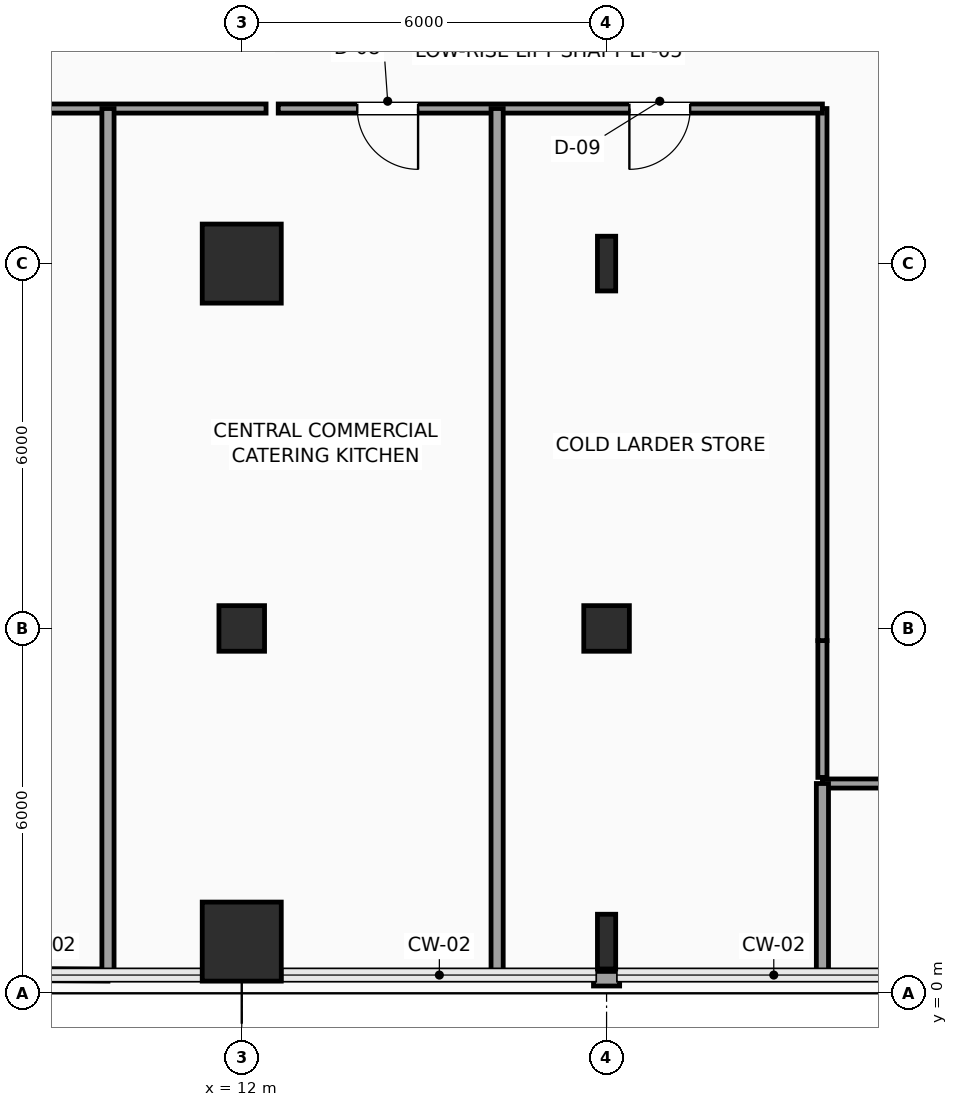
"""IFC4 building model, lengths in metres.
Left out: names, types, materials, properties, quantities, classifications, styles, units other than length and angle.
Written with IfcOpenShell. Run it as: python <this file> out.ifc"""

import sys

from ifc_helpers import new_model, si_unit, direction, frame, frame_2d, origin, origin_2d, place, context, subcontext, project, spatial, rectangle, hollow_rectangle, i_section, extrude, element, fill, save


model = new_model("IFC4")
c1 = context("Model", 3, precision=1e-05, world=origin(), true_north=direction((0.0, 1.0)))
c2 = subcontext(c1, "Body", "Model", "MODEL_VIEW")
j1 = project(units=[si_unit("LENGTHUNIT", "METRE"), si_unit("PLANEANGLEUNIT", "RADIAN")], contexts=[c1])
p1 = place(None, origin())
s1 = spatial("IfcSite", under=j1, at=p1, CompositionType="ELEMENT")
p2 = place(p1, origin())
s2 = spatial("IfcBuilding", under=s1, at=p2, CompositionType="ELEMENT")
p3 = place(p2, frame((0.0, 0.0, 75.3)))
s3 = spatial("IfcBuildingStorey", under=s2, at=p3, CompositionType="ELEMENT", Elevation=75.3)
p4 = place(p3, frame((12.0, 0.85, 0.0), z_axis=(0.0, 0.0, 1.0), x_axis=(1.0, 0.0, 0.0)))
e1 = element("IfcColumn", 1, at=p4, inside=s3, PredefinedType="COLUMN", context=c2, shape_type="SweptSolid", body=[
    extrude(rectangle(XDim=1.3, YDim=1.3, at=origin_2d()), origin(), (0.0, 0.0, 1.0), 3.9),
])
p5 = place(p3, frame((12.0, 6.0, 0.0), z_axis=(0.0, 0.0, 1.0), x_axis=(1.0, 0.0, 0.0)))
e2 = element("IfcColumn", 2, at=p5, inside=s3, PredefinedType="COLUMN", context=c2, shape_type="SweptSolid", body=[
    extrude(hollow_rectangle(XDim=0.75, YDim=0.75, WallThickness=0.035, InnerFilletRadius=0.035, OuterFilletRadius=0.05, at=origin_2d()), origin(), (0.0, 0.0, 1.0), 3.9),
])
p6 = place(p3, frame((12.0, 12.0, 0.0), z_axis=(0.0, 0.0, 1.0), x_axis=(1.0, 0.0, 0.0)))
e3 = element("IfcColumn", 3, at=p6, inside=s3, PredefinedType="COLUMN", context=c2, shape_type="SweptSolid", body=[
    extrude(rectangle(XDim=1.3, YDim=1.3, at=origin_2d()), origin(), (0.0, 0.0, 1.0), 3.9),
])
p7 = place(p3, frame((18.0, 0.85, 0.0), z_axis=(0.0, 0.0, 1.0), x_axis=(1.0, 0.0, 0.0)))
e4 = element("IfcColumn", 4, at=p7, inside=s3, PredefinedType="COLUMN", context=c2, shape_type="SweptSolid", body=[
    extrude(i_section(OverallWidth=0.3, OverallDepth=0.9, WebThickness=0.019, FlangeThickness=0.035, FilletRadius=0.03, at=origin_2d()), origin(), (0.0, 0.0, 1.0), 3.9),
])
p8 = place(p3, frame((18.0, 6.0, 0.0), z_axis=(0.0, 0.0, 1.0), x_axis=(1.0, 0.0, 0.0)))
e5 = element("IfcColumn", 5, at=p8, inside=s3, PredefinedType="COLUMN", context=c2, shape_type="SweptSolid", body=[
    extrude(hollow_rectangle(XDim=0.75, YDim=0.75, WallThickness=0.035, InnerFilletRadius=0.035, OuterFilletRadius=0.05, at=origin_2d()), origin(), (0.0, 0.0, 1.0), 3.9),
])
p9 = place(p3, frame((18.0, 12.0, 0.0), z_axis=(0.0, 0.0, 1.0), x_axis=(1.0, 0.0, 0.0)))
e6 = element("IfcColumn", 6, at=p9, inside=s3, PredefinedType="COLUMN", context=c2, shape_type="SweptSolid", body=[
    extrude(i_section(OverallWidth=0.3, OverallDepth=0.9, WebThickness=0.019, FlangeThickness=0.035, FilletRadius=0.03, at=origin_2d()), origin(), (0.0, 0.0, 1.0), 3.9),
])
p10 = place(p3, frame((18.215, 0.24, 0.0), z_axis=(0.0, 0.0, 1.0), x_axis=(-1.0, 0.0, 0.0)))
e7 = element("IfcWall", 7, at=p10, inside=s3, PredefinedType="SOLIDWALL", context=c2, shape_type="SweptSolid", body=[
    extrude(rectangle(XDim=0.43, YDim=0.24, at=frame_2d((0.215, 0.0))), origin(), (0.0, 0.0, 1.0), 3.65),
])
p11 = place(p3, frame((36.15, 3.45, 0.0), z_axis=(0.0, 0.0, 1.0), x_axis=(-1.0, 0.0, 0.0)))
e8 = element("IfcWall", 8, at=p11, inside=s3, PredefinedType="PARTITIONING", context=c2, shape_type="SweptSolid", body=[
    extrude(rectangle(XDim=14.6, YDim=0.15, at=frame_2d((7.3, 0.0))), origin(), (0.0, 0.0, 1.0), 3.142),
])
p12 = place(p11, frame((11.275, 0.0, 0.0)))
e9 = element("IfcOpeningElement", 9, at=p12, cuts=e8, PredefinedType="OPENING", context=c2, shape_type="SweptSolid", body=[
    extrude(rectangle(XDim=1.0, YDim=2.2, at=frame_2d((0.5, 1.1))), frame((0.0, 0.085, 0.0), z_axis=(0.0, -1.0, 0.0), x_axis=(1.0, 0.0, 0.0)), (0.0, 0.0, 1.0), 0.17),
])
p13 = place(p11, frame((5.65, 0.0, 0.0)))
e10 = element("IfcOpeningElement", 10, at=p13, cuts=e8, PredefinedType="OPENING", context=c2, shape_type="SweptSolid", body=[
    extrude(rectangle(XDim=1.0, YDim=2.2, at=frame_2d((0.5, 1.1))), frame((0.0, 0.085, 0.0), z_axis=(0.0, -1.0, 0.0), x_axis=(1.0, 0.0, 0.0)), (0.0, 0.0, 1.0), 0.17),
])
p14 = place(p3, frame((21.55, 3.55, 0.0), z_axis=(0.0, 0.0, 1.0), x_axis=(0.0, 1.0, 0.0)))
e11 = element("IfcWall", 11, at=p14, inside=s3, PredefinedType="PARTITIONING", context=c2, shape_type="SweptSolid", body=[
    extrude(rectangle(XDim=2.25, YDim=0.15, at=frame_2d((1.125, 0.0))), origin(), (0.0, 0.0, 1.0), 3.65),
])
p15 = place(p3, frame((21.55, 5.8, 0.0), z_axis=(0.0, 0.0, 1.0), x_axis=(0.0, 1.0, 0.0)))
e12 = element("IfcWall", 12, at=p15, inside=s3, PredefinedType="PARTITIONING", context=c2, shape_type="SweptSolid", body=[
    extrude(rectangle(XDim=8.75, YDim=0.15, at=frame_2d((4.375, 0.0))), origin(), (0.0, 0.0, 1.0), 3.65),
])
p16 = place(p3, frame((21.55, 14.55, 0.0), z_axis=(0.0, 0.0, 1.0), x_axis=(-1.0, 0.0, 0.0)))
e13 = element("IfcWall", 13, at=p16, inside=s3, PredefinedType="PARTITIONING", context=c2, shape_type="SweptSolid", body=[
    extrude(rectangle(XDim=8.95, YDim=0.15, at=frame_2d((4.475, 0.0))), origin(), (0.0, 0.0, 1.0), 3.65),
])
p17 = place(p16, frame((6.65, 0.0, 0.0)))
e14 = element("IfcOpeningElement", 14, at=p17, cuts=e13, PredefinedType="OPENING", context=c2, shape_type="SweptSolid", body=[
    extrude(rectangle(XDim=1.0, YDim=2.2, at=frame_2d((0.5, 1.1))), frame((0.0, 0.085, 0.0), z_axis=(0.0, -1.0, 0.0), x_axis=(1.0, 0.0, 0.0)), (0.0, 0.0, 1.0), 0.17),
])
p18 = place(p16, frame((2.175, 0.0, 0.0)))
e15 = element("IfcOpeningElement", 15, at=p18, cuts=e13, PredefinedType="OPENING", context=c2, shape_type="SweptSolid", body=[
    extrude(rectangle(XDim=1.0, YDim=2.2, at=frame_2d((0.5, 1.1))), frame((0.0, 0.085, 0.0), z_axis=(0.0, -1.0, 0.0), x_axis=(1.0, 0.0, 0.0)), (0.0, 0.0, 1.0), 0.17),
])
p19 = place(p3, frame((12.4, 14.55, 0.0), z_axis=(0.0, 0.0, 1.0), x_axis=(-1.0, 0.0, 0.0)))
e16 = element("IfcWall", 16, at=p19, inside=s3, PredefinedType="PARTITIONING", context=c2, shape_type="SweptSolid", body=[
    extrude(rectangle(XDim=7.15, YDim=0.15, at=frame_2d((3.575, 0.0))), origin(), (0.0, 0.0, 1.0), 3.65),
])
p20 = place(p19, frame((4.375, 0.0, 0.0)))
e17 = element("IfcOpeningElement", 17, at=p20, cuts=e16, PredefinedType="OPENING", context=c2, shape_type="SweptSolid", body=[
    extrude(rectangle(XDim=1.0, YDim=2.2, at=frame_2d((0.5, 1.1))), frame((0.0, 0.085, 0.0), z_axis=(0.0, -1.0, 0.0), x_axis=(1.0, 0.0, 0.0)), (0.0, 0.0, 1.0), 0.17),
])
p21 = place(p3, frame((6.215, 0.319, 0.0), z_axis=(0.0, 0.0, 1.0), x_axis=(0.999985892136, -0.005311829174, 0.0)))
e18 = element("IfcWall", 18, at=p21, inside=s3, PredefinedType="PARTITIONING", context=c2, shape_type="SweptSolid", body=[
    extrude(rectangle(XDim=3.585, YDim=0.2, at=frame_2d((1.792, 0.0))), origin(), (0.0, 0.0, 1.0), 3.65),
])
for number, where, z_axis, x_axis in (
    (19, (9.8, 0.3, 0.0), (0.0, 0.0, 1.0), (0.0, 1.0, 0.0)),
    (20, (16.2, 0.3, 0.0), (0.0, 0.0, 1.0), (0.0, 1.0, 0.0)),
):
    element("IfcWall", number, at=place(p3, frame(where, z_axis=z_axis, x_axis=x_axis)), inside=s3, PredefinedType="PARTITIONING", context=c2, shape_type="SweptSolid", body=[
        extrude(rectangle(XDim=14.25, YDim=0.2, at=frame_2d((7.125, 0.0))), origin(), (0.0, 0.0, 1.0), 3.65),
    ])
p22 = place(p3, frame((21.55, 0.3, 0.0), z_axis=(0.0, 0.0, 1.0), x_axis=(0.0, 1.0, 0.0)))
e21 = element("IfcWall", 21, at=p22, inside=s3, PredefinedType="PARTITIONING", context=c2, shape_type="SweptSolid", body=[
    extrude(rectangle(XDim=3.15, YDim=0.2, at=frame_2d((1.575, 0.0))), origin(), (0.0, 0.0, 1.0), 3.65),
])
p23 = place(p17, origin())
e22 = element("IfcDoor", 22, at=p23, inside=s3, OperationType="SINGLE_SWING_LEFT", PredefinedType="DOOR", context=c2, shape_type="SweptSolid", body=[
    extrude(rectangle(XDim=1.0, YDim=2.2, at=frame_2d((0.5, 1.1))), frame((0.0, 0.025, 0.0), z_axis=(0.0, -1.0, 0.0), x_axis=(1.0, 0.0, 0.0)), (0.0, 0.0, 1.0), 0.05),
])
fill(e14, e22)
p24 = place(p18, origin())
e23 = element("IfcDoor", 23, at=p24, inside=s3, OperationType="SINGLE_SWING_RIGHT", PredefinedType="DOOR", context=c2, shape_type="SweptSolid", body=[
    extrude(rectangle(XDim=1.0, YDim=2.2, at=frame_2d((0.5, 1.1))), frame((0.0, 0.025, 0.0), z_axis=(0.0, -1.0, 0.0), x_axis=(1.0, 0.0, 0.0)), (0.0, 0.0, 1.0), 0.05),
])
fill(e15, e23)
save(model, sys.argv[1])
